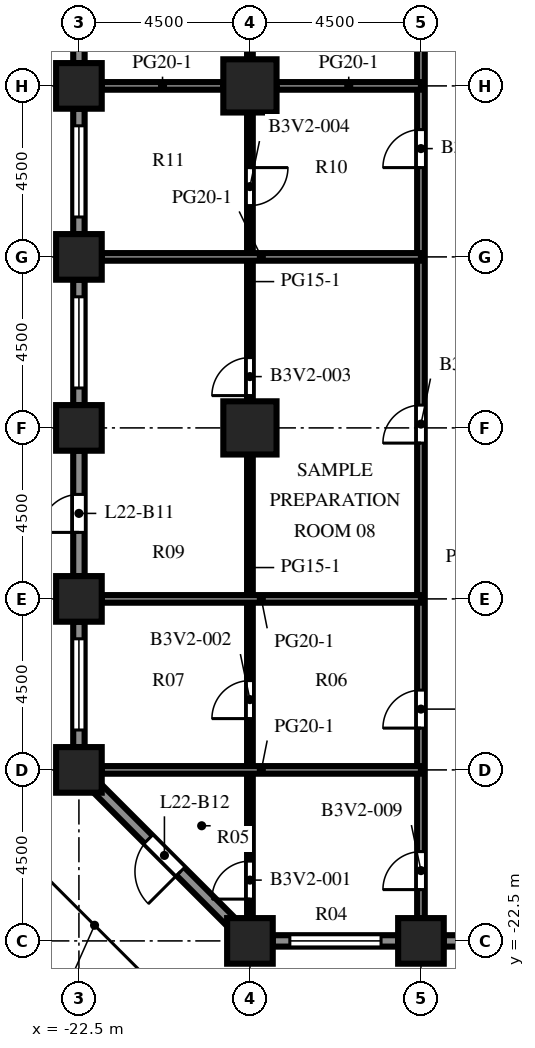
"""IFC4 building model, lengths in metres.
Left out: names, types, materials, properties, quantities, classifications, styles, units other than length and angle.
Written with IfcOpenShell. Run it as: python <this file> out.ifc"""

import sys

from ifc_helpers import new_model, si_unit, direction, frame, frame_2d, origin, origin_2d, place, context, subcontext, project, spatial, rectangle, extrude, element, fill, save


model = new_model("IFC4")
c1 = context("Model", 3, precision=1e-05, world=origin(), true_north=direction((0.0, 1.0)))
c2 = subcontext(c1, "Body", "Model", "MODEL_VIEW")
j1 = project(units=[si_unit("LENGTHUNIT", "METRE"), si_unit("PLANEANGLEUNIT", "RADIAN")], contexts=[c1])
p1 = place(None, origin())
s1 = spatial("IfcSite", under=j1, at=p1, CompositionType="ELEMENT")
p2 = place(p1, origin())
s2 = spatial("IfcBuilding", under=s1, at=p2, CompositionType="ELEMENT")
p3 = place(p2, frame((0.0, 0.0, 98.4)))
s3 = spatial("IfcBuildingStorey", under=s2, at=p3, CompositionType="ELEMENT", Elevation=98.4)
for number, where, z_axis, x_axis in (
    (1, (-22.5, -18.0, 0.0), (0.0, 0.0, 1.0), (1.0, 0.0, 0.0)),
    (2, (-22.5, -13.5, 0.0), (0.0, 0.0, 1.0), (1.0, 0.0, 0.0)),
    (3, (-22.5, -9.0, 0.0), (0.0, 0.0, 1.0), (1.0, 0.0, 0.0)),
    (4, (-22.5, -4.5, 0.0), (0.0, 0.0, 1.0), (1.0, 0.0, 0.0)),
    (5, (-22.5, 0.0, 0.0), (0.0, 0.0, 1.0), (1.0, 0.0, 0.0)),
    (6, (-18.0, -22.5, 0.0), (0.0, 0.0, 1.0), (1.0, 0.0, 0.0)),
    (7, (-13.5, -22.5, 0.0), (0.0, 0.0, 1.0), (1.0, 0.0, 0.0)),
):
    element("IfcColumn", number, at=place(p3, frame(where, z_axis=z_axis, x_axis=x_axis)), inside=s3, PredefinedType="COLUMN", context=c2, shape_type="SweptSolid", body=[
        extrude(rectangle(XDim=1.2, YDim=1.2, at=origin_2d()), origin(), (0.0, 0.0, 1.0), 4.1),
    ])
for number, where, z_axis, x_axis in (
    (8, (-18.0, -9.0, 0.0), (0.0, 0.0, 1.0), (1.0, 0.0, 0.0)),
    (9, (-18.0, 0.0, 0.0), (0.0, 0.0, 1.0), (1.0, 0.0, 0.0)),
):
    element("IfcColumn", number, at=place(p3, frame(where, z_axis=z_axis, x_axis=x_axis)), inside=s3, PredefinedType="COLUMN", context=c2, shape_type="SweptSolid", body=[
        extrude(rectangle(XDim=1.4, YDim=1.4, at=origin_2d()), origin(), (0.0, 0.0, 1.0), 4.1),
    ])
p4 = place(p3, frame((-14.1, -22.5, 0.0), z_axis=(0.0, 0.0, 1.0), x_axis=(-1.0, 0.0, 0.0)))
e10 = element("IfcWall", 10, at=p4, inside=s3, PredefinedType="SOLIDWALL", context=c2, shape_type="SweptSolid", body=[
    extrude(rectangle(XDim=3.3, YDim=0.3, at=frame_2d((1.65, 0.0))), origin(), (0.0, 0.0, 1.0), 2.75),
])
p5 = place(p4, frame((0.45, 0.0, 0.8)))
e11 = element("IfcOpeningElement", 11, at=p5, cuts=e10, PredefinedType="OPENING", context=c2, shape_type="SweptSolid", body=[
    extrude(rectangle(XDim=2.4, YDim=1.7, at=frame_2d((1.2, 0.85))), frame((0.0, 0.16, 0.0), z_axis=(0.0, -1.0, 0.0), x_axis=(1.0, 0.0, 0.0)), (0.0, 0.0, 1.0), 0.32),
])
p6 = place(p3, frame((-9.6, -22.5, 0.0), z_axis=(0.0, 0.0, 1.0), x_axis=(-1.0, 0.0, 0.0)))
e12 = element("IfcWall", 12, at=p6, inside=s3, PredefinedType="SOLIDWALL", context=c2, shape_type="SweptSolid", body=[
    extrude(rectangle(XDim=3.3, YDim=0.3, at=frame_2d((1.65, 0.0))), origin(), (0.0, 0.0, 1.0), 2.75),
])
p7 = place(p6, frame((1.15, 0.0, 0.0)))
e13 = element("IfcOpeningElement", 13, at=p7, cuts=e12, PredefinedType="OPENING", context=c2, shape_type="SweptSolid", body=[
    extrude(rectangle(XDim=1.0, YDim=2.2, at=frame_2d((0.5, 1.1))), frame((0.0, 0.16, 0.0), z_axis=(0.0, -1.0, 0.0), x_axis=(1.0, 0.0, 0.0)), (0.0, 0.0, 1.0), 0.32),
])
p8 = place(p3, frame((-22.5, 0.6, 0.0), z_axis=(0.0, 0.0, 1.0), x_axis=(0.0, 1.0, 0.0)))
e14 = element("IfcWall", 14, at=p8, inside=s3, PredefinedType="SOLIDWALL", context=c2, shape_type="SweptSolid", body=[
    extrude(rectangle(XDim=3.3, YDim=0.3, at=frame_2d((1.65, 0.0))), origin(), (0.0, 0.0, 1.0), 2.75),
])
p9 = place(p8, frame((0.45, 0.0, 0.8)))
e15 = element("IfcOpeningElement", 15, at=p9, cuts=e14, PredefinedType="OPENING", context=c2, shape_type="SweptSolid", body=[
    extrude(rectangle(XDim=2.4, YDim=1.7, at=frame_2d((1.2, 0.85))), frame((0.0, 0.16, 0.0), z_axis=(0.0, -1.0, 0.0), x_axis=(1.0, 0.0, 0.0)), (0.0, 0.0, 1.0), 0.32),
])
p10 = place(p3, frame((-22.5, -3.9, 0.0), z_axis=(0.0, 0.0, 1.0), x_axis=(0.0, 1.0, 0.0)))
e16 = element("IfcWall", 16, at=p10, inside=s3, PredefinedType="SOLIDWALL", context=c2, shape_type="SweptSolid", body=[
    extrude(rectangle(XDim=3.3, YDim=0.3, at=frame_2d((1.65, 0.0))), origin(), (0.0, 0.0, 1.0), 2.75),
])
p11 = place(p10, frame((0.45, 0.0, 0.8)))
e17 = element("IfcOpeningElement", 17, at=p11, cuts=e16, PredefinedType="OPENING", context=c2, shape_type="SweptSolid", body=[
    extrude(rectangle(XDim=2.4, YDim=1.7, at=frame_2d((1.2, 0.85))), frame((0.0, 0.16, 0.0), z_axis=(0.0, -1.0, 0.0), x_axis=(1.0, 0.0, 0.0)), (0.0, 0.0, 1.0), 0.32),
])
p12 = place(p3, frame((-22.5, -8.4, 0.0), z_axis=(0.0, 0.0, 1.0), x_axis=(0.0, 1.0, 0.0)))
e18 = element("IfcWall", 18, at=p12, inside=s3, PredefinedType="SOLIDWALL", context=c2, shape_type="SweptSolid", body=[
    extrude(rectangle(XDim=3.3, YDim=0.3, at=frame_2d((1.65, 0.0))), origin(), (0.0, 0.0, 1.0), 2.75),
])
p13 = place(p12, frame((0.45, 0.0, 0.8)))
e19 = element("IfcOpeningElement", 19, at=p13, cuts=e18, PredefinedType="OPENING", context=c2, shape_type="SweptSolid", body=[
    extrude(rectangle(XDim=2.4, YDim=1.7, at=frame_2d((1.2, 0.85))), frame((0.0, 0.16, 0.0), z_axis=(0.0, -1.0, 0.0), x_axis=(1.0, 0.0, 0.0)), (0.0, 0.0, 1.0), 0.32),
])
p14 = place(p3, frame((-22.5, -12.9, 0.0), z_axis=(0.0, 0.0, 1.0), x_axis=(0.0, 1.0, 0.0)))
e20 = element("IfcWall", 20, at=p14, inside=s3, PredefinedType="SOLIDWALL", context=c2, shape_type="SweptSolid", body=[
    extrude(rectangle(XDim=3.3, YDim=0.3, at=frame_2d((1.65, 0.0))), origin(), (0.0, 0.0, 1.0), 2.75),
])
p15 = place(p14, frame((1.15, 0.0, 0.0)))
e21 = element("IfcOpeningElement", 21, at=p15, cuts=e20, PredefinedType="OPENING", context=c2, shape_type="SweptSolid", body=[
    extrude(rectangle(XDim=1.0, YDim=2.2, at=frame_2d((0.5, 1.1))), frame((0.0, 0.16, 0.0), z_axis=(0.0, -1.0, 0.0), x_axis=(1.0, 0.0, 0.0)), (0.0, 0.0, 1.0), 0.32),
])
p16 = place(p3, frame((-22.5, -17.4, 0.0), z_axis=(0.0, 0.0, 1.0), x_axis=(0.0, 1.0, 0.0)))
e22 = element("IfcWall", 22, at=p16, inside=s3, PredefinedType="SOLIDWALL", context=c2, shape_type="SweptSolid", body=[
    extrude(rectangle(XDim=3.3, YDim=0.3, at=frame_2d((1.65, 0.0))), origin(), (0.0, 0.0, 1.0), 2.75),
])
p17 = place(p16, frame((0.45, 0.0, 0.8)))
e23 = element("IfcOpeningElement", 23, at=p17, cuts=e22, PredefinedType="OPENING", context=c2, shape_type="SweptSolid", body=[
    extrude(rectangle(XDim=2.4, YDim=1.7, at=frame_2d((1.2, 0.85))), frame((0.0, 0.16, 0.0), z_axis=(0.0, -1.0, 0.0), x_axis=(1.0, 0.0, 0.0)), (0.0, 0.0, 1.0), 0.32),
])
p18 = place(p3, frame((-18.494, -22.006, 0.0), z_axis=(0.0, 0.0, 1.0), x_axis=(-0.707106781187, 0.707106781187, 0.0)))
e24 = element("IfcWall", 24, at=p18, inside=s3, PredefinedType="SOLIDWALL", context=c2, shape_type="SweptSolid", body=[
    extrude(rectangle(XDim=4.967, YDim=0.3, at=frame_2d((2.483, 0.0))), origin(), (0.0, 0.0, 1.0), 2.75),
])
p19 = place(p18, frame((1.884, 0.0, 0.0)))
e25 = element("IfcOpeningElement", 25, at=p19, cuts=e24, PredefinedType="OPENING", context=c2, shape_type="SweptSolid", body=[
    extrude(rectangle(XDim=1.2, YDim=2.2, at=frame_2d((0.6, 1.1))), frame((0.0, 0.16, 0.0), z_axis=(0.0, -1.0, 0.0), x_axis=(1.0, 0.0, 0.0)), (0.0, 0.0, 1.0), 0.32),
])
p20 = place(p3, frame((-18.0, -21.9, 0.0), z_axis=(0.0, 0.0, 1.0), x_axis=(0.0, 1.0, 0.0)))
e26 = element("IfcWall", 26, at=p20, inside=s3, PredefinedType="PARTITIONING", context=c2, shape_type="SweptSolid", body=[
    extrude(rectangle(XDim=12.2, YDim=0.15, at=frame_2d((6.1, 0.0))), origin(), (0.0, 0.0, 1.0), 3.65),
])
p21 = place(p20, frame((0.5, 0.0, 0.0)))
e27 = element("IfcOpeningElement", 27, at=p21, cuts=e26, PredefinedType="OPENING", context=c2, shape_type="SweptSolid", body=[
    extrude(rectangle(XDim=1.0, YDim=2.1, at=frame_2d((0.5, 1.05))), frame((0.0, 0.085, 0.0), z_axis=(0.0, -1.0, 0.0), x_axis=(1.0, 0.0, 0.0)), (0.0, 0.0, 1.0), 0.17),
])
p22 = place(p20, frame((5.25, 0.0, 0.0)))
e28 = element("IfcOpeningElement", 28, at=p22, cuts=e26, PredefinedType="OPENING", context=c2, shape_type="SweptSolid", body=[
    extrude(rectangle(XDim=1.0, YDim=2.1, at=frame_2d((0.5, 1.05))), frame((0.0, 0.085, 0.0), z_axis=(0.0, -1.0, 0.0), x_axis=(1.0, 0.0, 0.0)), (0.0, 0.0, 1.0), 0.17),
])
p23 = place(p3, frame((-18.0, -8.3, 0.0), z_axis=(0.0, 0.0, 1.0), x_axis=(0.0, 1.0, 0.0)))
e29 = element("IfcWall", 29, at=p23, inside=s3, PredefinedType="PARTITIONING", context=c2, shape_type="SweptSolid", body=[
    extrude(rectangle(XDim=7.6, YDim=0.15, at=frame_2d((3.8, 0.0))), origin(), (0.0, 0.0, 1.0), 3.65),
])
p24 = place(p23, frame((0.15, 0.0, 0.0)))
e30 = element("IfcOpeningElement", 30, at=p24, cuts=e29, PredefinedType="OPENING", context=c2, shape_type="SweptSolid", body=[
    extrude(rectangle(XDim=1.0, YDim=2.1, at=frame_2d((0.5, 1.05))), frame((0.0, 0.085, 0.0), z_axis=(0.0, -1.0, 0.0), x_axis=(1.0, 0.0, 0.0)), (0.0, 0.0, 1.0), 0.17),
])
p25 = place(p23, frame((5.15, 0.0, 0.0)))
e31 = element("IfcOpeningElement", 31, at=p25, cuts=e29, PredefinedType="OPENING", context=c2, shape_type="SweptSolid", body=[
    extrude(rectangle(XDim=1.0, YDim=2.1, at=frame_2d((0.5, 1.05))), frame((0.0, 0.085, 0.0), z_axis=(0.0, -1.0, 0.0), x_axis=(1.0, 0.0, 0.0)), (0.0, 0.0, 1.0), 0.17),
])
p26 = place(p3, frame((-18.0, 0.7, 0.0), z_axis=(0.0, 0.0, 1.0), x_axis=(0.0, 1.0, 0.0)))
e32 = element("IfcWall", 32, at=p26, inside=s3, PredefinedType="PARTITIONING", context=c2, shape_type="SweptSolid", body=[
    extrude(rectangle(XDim=7.6, YDim=0.15, at=frame_2d((3.8, 0.0))), origin(), (0.0, 0.0, 1.0), 3.65),
])
p27 = place(p26, frame((3.65, 0.0, 0.0)))
e33 = element("IfcOpeningElement", 33, at=p27, cuts=e32, PredefinedType="OPENING", context=c2, shape_type="SweptSolid", body=[
    extrude(rectangle(XDim=1.0, YDim=2.1, at=frame_2d((0.5, 1.05))), frame((0.0, 0.085, 0.0), z_axis=(0.0, -1.0, 0.0), x_axis=(1.0, 0.0, 0.0)), (0.0, 0.0, 1.0), 0.17),
])
p28 = place(p3, frame((-13.5, -21.9, 0.0), z_axis=(0.0, 0.0, 1.0), x_axis=(0.0, 1.0, 0.0)))
e34 = element("IfcWall", 34, at=p28, inside=s3, PredefinedType="PARTITIONING", context=c2, shape_type="SweptSolid", body=[
    extrude(rectangle(XDim=52.8, YDim=0.2, at=frame_2d((26.4, 0.0))), origin(), (0.0, 0.0, 1.0), 3.65),
])
p29 = place(p28, frame((0.75, 0.0, 0.0)))
e35 = element("IfcOpeningElement", 35, at=p29, cuts=e34, PredefinedType="OPENING", context=c2, shape_type="SweptSolid", body=[
    extrude(rectangle(XDim=1.0, YDim=2.1, at=frame_2d((0.5, 1.05))), frame((0.0, 0.11, 0.0), z_axis=(0.0, -1.0, 0.0), x_axis=(1.0, 0.0, 0.0)), (0.0, 0.0, 1.0), 0.22),
])
p30 = place(p28, frame((5.0, 0.0, 0.0)))
e36 = element("IfcOpeningElement", 36, at=p30, cuts=e34, PredefinedType="OPENING", context=c2, shape_type="SweptSolid", body=[
    extrude(rectangle(XDim=1.0, YDim=2.1, at=frame_2d((0.5, 1.05))), frame((0.0, 0.11, 0.0), z_axis=(0.0, -1.0, 0.0), x_axis=(1.0, 0.0, 0.0)), (0.0, 0.0, 1.0), 0.22),
])
p31 = place(p28, frame((12.5, 0.0, 0.0)))
e37 = element("IfcOpeningElement", 37, at=p31, cuts=e34, PredefinedType="OPENING", context=c2, shape_type="SweptSolid", body=[
    extrude(rectangle(XDim=1.0, YDim=2.1, at=frame_2d((0.5, 1.05))), frame((0.0, 0.11, 0.0), z_axis=(0.0, -1.0, 0.0), x_axis=(1.0, 0.0, 0.0)), (0.0, 0.0, 1.0), 0.22),
])
p32 = place(p28, frame((19.75, 0.0, 0.0)))
e38 = element("IfcOpeningElement", 38, at=p32, cuts=e34, PredefinedType="OPENING", context=c2, shape_type="SweptSolid", body=[
    extrude(rectangle(XDim=1.0, YDim=2.1, at=frame_2d((0.5, 1.05))), frame((0.0, 0.11, 0.0), z_axis=(0.0, -1.0, 0.0), x_axis=(1.0, 0.0, 0.0)), (0.0, 0.0, 1.0), 0.22),
])
p33 = place(p28, frame((26.0, 0.0, 0.0)))
e39 = element("IfcOpeningElement", 39, at=p33, cuts=e34, PredefinedType="OPENING", context=c2, shape_type="SweptSolid", body=[
    extrude(rectangle(XDim=1.0, YDim=2.1, at=frame_2d((0.5, 1.05))), frame((0.0, 0.11, 0.0), z_axis=(0.0, -1.0, 0.0), x_axis=(1.0, 0.0, 0.0)), (0.0, 0.0, 1.0), 0.22),
])
p34 = place(p28, frame((37.5, 0.0, 0.0)))
e40 = element("IfcOpeningElement", 40, at=p34, cuts=e34, PredefinedType="OPENING", context=c2, shape_type="SweptSolid", body=[
    extrude(rectangle(XDim=1.0, YDim=2.1, at=frame_2d((0.5, 1.05))), frame((0.0, 0.11, 0.0), z_axis=(0.0, -1.0, 0.0), x_axis=(1.0, 0.0, 0.0)), (0.0, 0.0, 1.0), 0.22),
])
p35 = place(p28, frame((43.25, 0.0, 0.0)))
e41 = element("IfcOpeningElement", 41, at=p35, cuts=e34, PredefinedType="OPENING", context=c2, shape_type="SweptSolid", body=[
    extrude(rectangle(XDim=1.0, YDim=2.1, at=frame_2d((0.5, 1.05))), frame((0.0, 0.11, 0.0), z_axis=(0.0, -1.0, 0.0), x_axis=(1.0, 0.0, 0.0)), (0.0, 0.0, 1.0), 0.22),
])
p36 = place(p28, frame((50.0, 0.0, 0.0)))
e42 = element("IfcOpeningElement", 42, at=p36, cuts=e34, PredefinedType="OPENING", context=c2, shape_type="SweptSolid", body=[
    extrude(rectangle(XDim=1.0, YDim=2.1, at=frame_2d((0.5, 1.05))), frame((0.0, 0.11, 0.0), z_axis=(0.0, -1.0, 0.0), x_axis=(1.0, 0.0, 0.0)), (0.0, 0.0, 1.0), 0.22),
])
for number, where, z_axis, x_axis in (
    (43, (-21.9, -18.0, 0.0), (0.0, 0.0, 1.0), (1.0, 0.0, 0.0)),
    (44, (-21.9, -13.5, 0.0), (0.0, 0.0, 1.0), (1.0, 0.0, 0.0)),
    (45, (-21.9, -4.5, 0.0), (0.0, 0.0, 1.0), (1.0, 0.0, 0.0)),
):
    element("IfcWall", number, at=place(p3, frame(where, z_axis=z_axis, x_axis=x_axis)), inside=s3, PredefinedType="PARTITIONING", context=c2, shape_type="SweptSolid", body=[
        extrude(rectangle(XDim=8.4, YDim=0.2, at=frame_2d((4.2, 0.0))), origin(), (0.0, 0.0, 1.0), 3.65),
    ])
p37 = place(p3, frame((-21.9, 0.0, 0.0), z_axis=(0.0, 0.0, 1.0), x_axis=(1.0, 0.0, 0.0)))
e46 = element("IfcWall", 46, at=p37, inside=s3, PredefinedType="PARTITIONING", context=c2, shape_type="SweptSolid", body=[
    extrude(rectangle(XDim=3.2, YDim=0.2, at=frame_2d((1.6, 0.0))), origin(), (0.0, 0.0, 1.0), 3.65),
])
p38 = place(p3, frame((-17.3, 0.0, 0.0), z_axis=(0.0, 0.0, 1.0), x_axis=(1.0, 0.0, 0.0)))
e47 = element("IfcWall", 47, at=p38, inside=s3, PredefinedType="PARTITIONING", context=c2, shape_type="SweptSolid", body=[
    extrude(rectangle(XDim=3.8, YDim=0.2, at=frame_2d((1.9, 0.0))), origin(), (0.0, 0.0, 1.0), 3.65),
])
p39 = place(p5, origin())
e48 = element("IfcWindow", 48, at=p39, inside=s3, PartitioningType="SINGLE_PANEL", PredefinedType="WINDOW", context=c2, shape_type="SweptSolid", body=[
    extrude(rectangle(XDim=2.4, YDim=1.7, at=frame_2d((1.2, 0.85))), frame((0.0, 0.03, 0.0), z_axis=(0.0, -1.0, 0.0), x_axis=(1.0, 0.0, 0.0)), (0.0, 0.0, 1.0), 0.06),
])
fill(e11, e48)
p40 = place(p11, origin())
e49 = element("IfcWindow", 49, at=p40, inside=s3, PartitioningType="SINGLE_PANEL", PredefinedType="WINDOW", context=c2, shape_type="SweptSolid", body=[
    extrude(rectangle(XDim=2.4, YDim=1.7, at=frame_2d((1.2, 0.85))), frame((0.0, 0.03, 0.0), z_axis=(0.0, -1.0, 0.0), x_axis=(1.0, 0.0, 0.0)), (0.0, 0.0, 1.0), 0.06),
])
fill(e17, e49)
p41 = place(p13, origin())
e50 = element("IfcWindow", 50, at=p41, inside=s3, PartitioningType="SINGLE_PANEL", PredefinedType="WINDOW", context=c2, shape_type="SweptSolid", body=[
    extrude(rectangle(XDim=2.4, YDim=1.7, at=frame_2d((1.2, 0.85))), frame((0.0, 0.03, 0.0), z_axis=(0.0, -1.0, 0.0), x_axis=(1.0, 0.0, 0.0)), (0.0, 0.0, 1.0), 0.06),
])
fill(e19, e50)
p42 = place(p15, origin())
e51 = element("IfcDoor", 51, at=p42, inside=s3, OperationType="SINGLE_SWING_LEFT", PredefinedType="DOOR", context=c2, shape_type="SweptSolid", body=[
    extrude(rectangle(XDim=1.0, YDim=2.2, at=frame_2d((0.5, 1.1))), frame((0.0, 0.025, 0.0), z_axis=(0.0, -1.0, 0.0), x_axis=(1.0, 0.0, 0.0)), (0.0, 0.0, 1.0), 0.05),
])
fill(e21, e51)
p43 = place(p17, origin())
e52 = element("IfcWindow", 52, at=p43, inside=s3, PartitioningType="SINGLE_PANEL", PredefinedType="WINDOW", context=c2, shape_type="SweptSolid", body=[
    extrude(rectangle(XDim=2.4, YDim=1.7, at=frame_2d((1.2, 0.85))), frame((0.0, 0.03, 0.0), z_axis=(0.0, -1.0, 0.0), x_axis=(1.0, 0.0, 0.0)), (0.0, 0.0, 1.0), 0.06),
])
fill(e23, e52)
p44 = place(p19, origin())
e53 = element("IfcDoor", 53, at=p44, inside=s3, OperationType="SINGLE_SWING_LEFT", PredefinedType="DOOR", context=c2, shape_type="SweptSolid", body=[
    extrude(rectangle(XDim=1.2, YDim=2.2, at=frame_2d((0.6, 1.1))), frame((0.0, 0.025, 0.0), z_axis=(0.0, -1.0, 0.0), x_axis=(1.0, 0.0, 0.0)), (0.0, 0.0, 1.0), 0.05),
])
fill(e25, e53)
p45 = place(p21, origin())
e54 = element("IfcDoor", 54, at=p45, inside=s3, OperationType="SINGLE_SWING_LEFT", PredefinedType="DOOR", context=c2, shape_type="SweptSolid", body=[
    extrude(rectangle(XDim=1.0, YDim=2.1, at=frame_2d((0.5, 1.05))), frame((0.0, 0.025, 0.0), z_axis=(0.0, -1.0, 0.0), x_axis=(1.0, 0.0, 0.0)), (0.0, 0.0, 1.0), 0.05),
])
fill(e27, e54)
p46 = place(p22, origin())
e55 = element("IfcDoor", 55, at=p46, inside=s3, OperationType="SINGLE_SWING_LEFT", PredefinedType="DOOR", context=c2, shape_type="SweptSolid", body=[
    extrude(rectangle(XDim=1.0, YDim=2.1, at=frame_2d((0.5, 1.05))), frame((0.0, 0.025, 0.0), z_axis=(0.0, -1.0, 0.0), x_axis=(1.0, 0.0, 0.0)), (0.0, 0.0, 1.0), 0.05),
])
fill(e28, e55)
p47 = place(p24, origin())
e56 = element("IfcDoor", 56, at=p47, inside=s3, OperationType="SINGLE_SWING_LEFT", PredefinedType="DOOR", context=c2, shape_type="SweptSolid", body=[
    extrude(rectangle(XDim=1.0, YDim=2.1, at=frame_2d((0.5, 1.05))), frame((0.0, 0.025, 0.0), z_axis=(0.0, -1.0, 0.0), x_axis=(1.0, 0.0, 0.0)), (0.0, 0.0, 1.0), 0.05),
])
fill(e30, e56)
p48 = place(p25, origin())
e57 = element("IfcDoor", 57, at=p48, inside=s3, OperationType="SINGLE_SWING_RIGHT", PredefinedType="DOOR", context=c2, shape_type="SweptSolid", body=[
    extrude(rectangle(XDim=1.0, YDim=2.1, at=frame_2d((0.5, 1.05))), frame((0.0, 0.025, 0.0), z_axis=(0.0, -1.0, 0.0), x_axis=(1.0, 0.0, 0.0)), (0.0, 0.0, 1.0), 0.05),
])
fill(e31, e57)
p49 = place(p29, origin())
e58 = element("IfcDoor", 58, at=p49, inside=s3, OperationType="SINGLE_SWING_LEFT", PredefinedType="DOOR", context=c2, shape_type="SweptSolid", body=[
    extrude(rectangle(XDim=1.0, YDim=2.1, at=frame_2d((0.5, 1.05))), frame((0.0, 0.025, 0.0), z_axis=(0.0, -1.0, 0.0), x_axis=(1.0, 0.0, 0.0)), (0.0, 0.0, 1.0), 0.05),
])
fill(e35, e58)
p50 = place(p30, origin())
e59 = element("IfcDoor", 59, at=p50, inside=s3, OperationType="SINGLE_SWING_LEFT", PredefinedType="DOOR", context=c2, shape_type="SweptSolid", body=[
    extrude(rectangle(XDim=1.0, YDim=2.1, at=frame_2d((0.5, 1.05))), frame((0.0, 0.025, 0.0), z_axis=(0.0, -1.0, 0.0), x_axis=(1.0, 0.0, 0.0)), (0.0, 0.0, 1.0), 0.05),
])
fill(e36, e59)
p51 = place(p31, origin())
e60 = element("IfcDoor", 60, at=p51, inside=s3, OperationType="SINGLE_SWING_LEFT", PredefinedType="DOOR", context=c2, shape_type="SweptSolid", body=[
    extrude(rectangle(XDim=1.0, YDim=2.1, at=frame_2d((0.5, 1.05))), frame((0.0, 0.025, 0.0), z_axis=(0.0, -1.0, 0.0), x_axis=(1.0, 0.0, 0.0)), (0.0, 0.0, 1.0), 0.05),
])
fill(e37, e60)
p52 = place(p32, origin())
e61 = element("IfcDoor", 61, at=p52, inside=s3, OperationType="SINGLE_SWING_LEFT", PredefinedType="DOOR", context=c2, shape_type="SweptSolid", body=[
    extrude(rectangle(XDim=1.0, YDim=2.1, at=frame_2d((0.5, 1.05))), frame((0.0, 0.025, 0.0), z_axis=(0.0, -1.0, 0.0), x_axis=(1.0, 0.0, 0.0)), (0.0, 0.0, 1.0), 0.05),
])
fill(e38, e61)
save(model, sys.argv[1])
